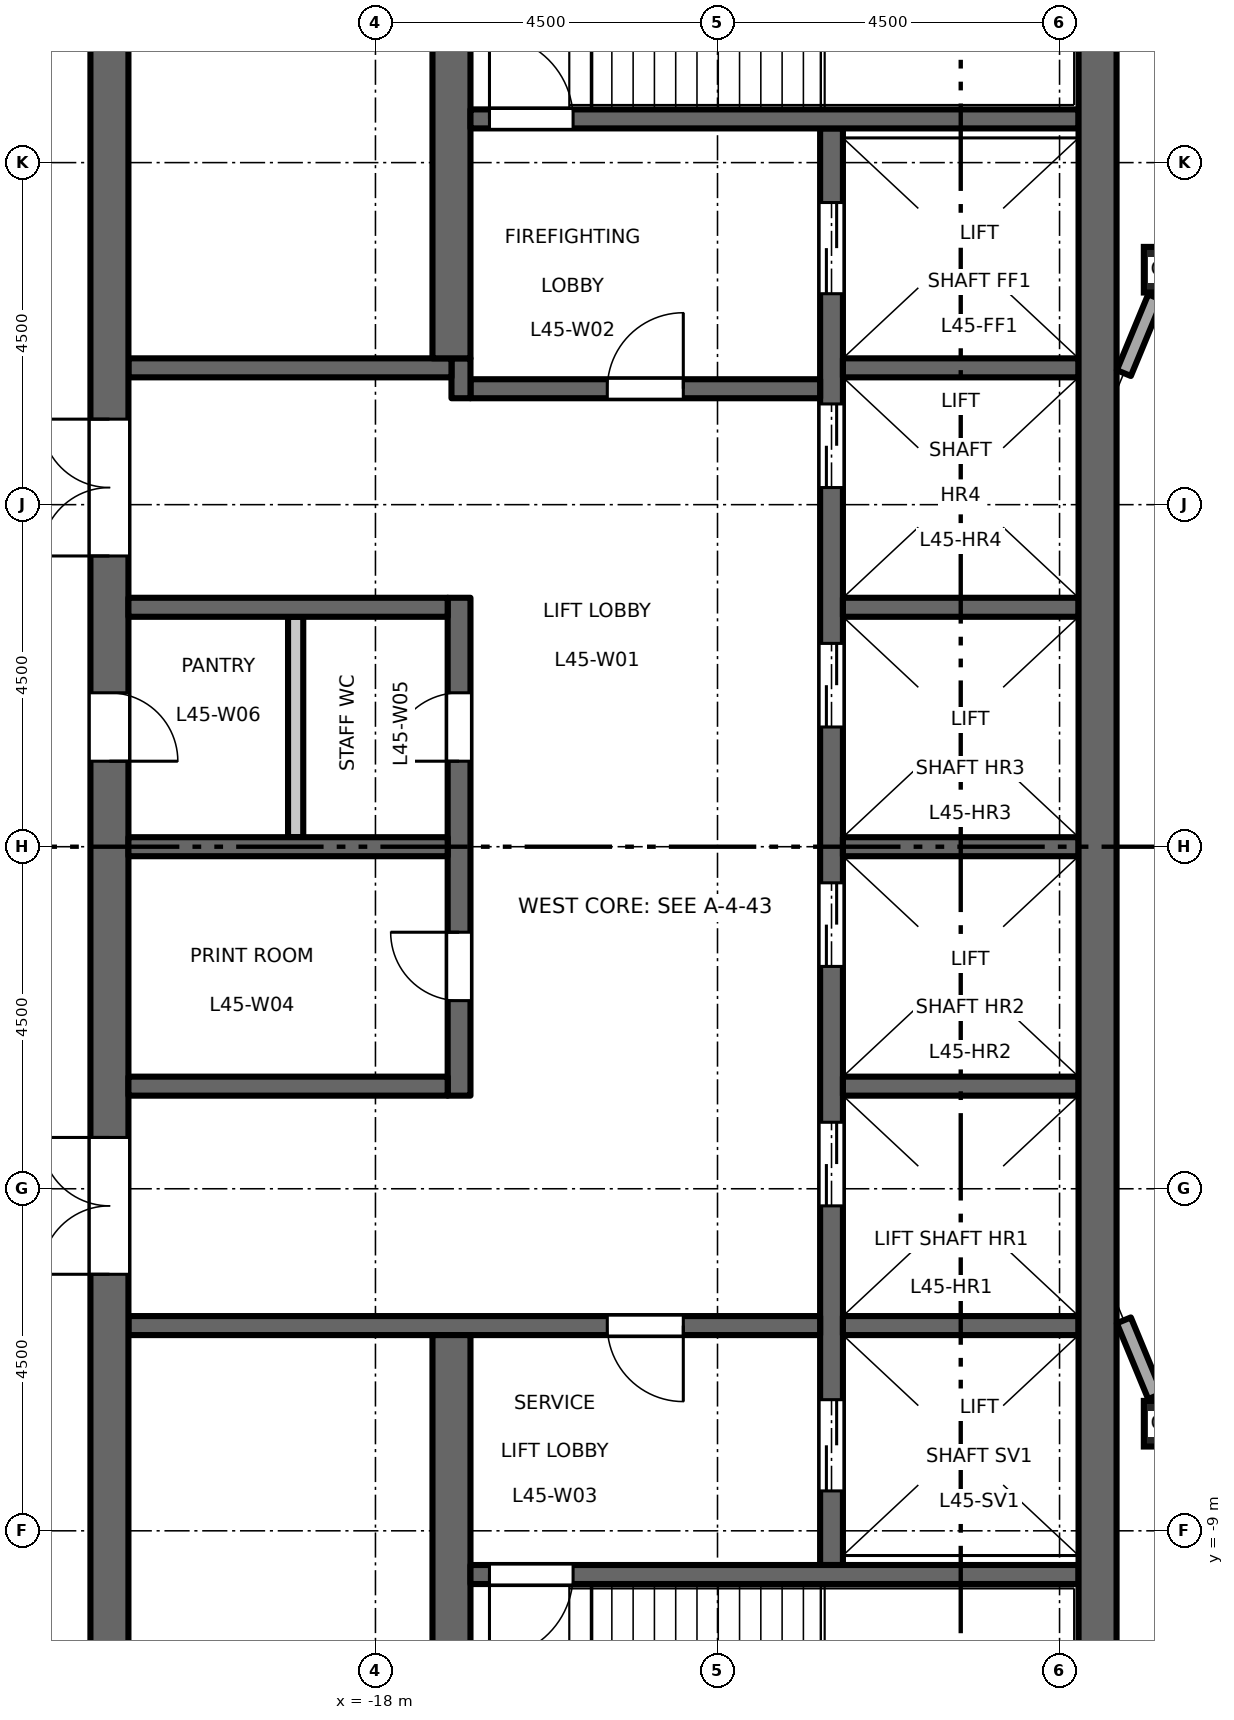
"""IFC4 building model, lengths in metres.
Left out: names, types, materials, properties, quantities, classifications, styles, units other than length and angle.
Written with IfcOpenShell. Run it as: python <this file> out.ifc"""

import sys

from ifc_helpers import new_model, si_unit, direction, frame, frame_2d, origin, origin_2d, place, context, subcontext, project, spatial, rectangle, hollow_rectangle, extrude, element, fill, save


model = new_model("IFC4")
c1 = context("Model", 3, precision=1e-05, world=origin(), true_north=direction((0.0, 1.0)))
c2 = subcontext(c1, "Body", "Model", "MODEL_VIEW")
j1 = project(units=[si_unit("LENGTHUNIT", "METRE"), si_unit("PLANEANGLEUNIT", "RADIAN")], contexts=[c1])
p1 = place(None, origin())
s1 = spatial("IfcSite", under=j1, at=p1, CompositionType="ELEMENT")
p2 = place(p1, origin())
s2 = spatial("IfcBuilding", under=s1, at=p2, CompositionType="ELEMENT")
p3 = place(p2, frame((0.0, 0.0, 210.7)))
s3 = spatial("IfcBuildingStorey", under=s2, at=p3, CompositionType="ELEMENT", Elevation=210.7)
for number, where, z_axis, x_axis in (
    (1, (-7.591, -7.591, 0.0), (0.0, 0.0, 1.0), (1.0, 0.0, 0.0)),
    (2, (-7.591, 7.591, 0.0), (0.0, 0.0, 1.0), (1.0, 0.0, 0.0)),
):
    element("IfcColumn", number, at=place(p3, frame(where, z_axis=z_axis, x_axis=x_axis)), inside=s3, PredefinedType="COLUMN", context=c2, shape_type="SweptSolid", body=[
        extrude(hollow_rectangle(XDim=0.6, YDim=0.6, WallThickness=0.032, at=origin_2d()), origin(), (0.0, 0.0, 1.0), 4.5),
    ])
p4 = place(p3, frame((-12.0, -9.45, 0.0), z_axis=(0.0, 0.0, 1.0), x_axis=(0.0, 1.0, 0.0)))
e3 = element("IfcWall", 3, at=p4, inside=s3, PredefinedType="SHEAR", context=c2, shape_type="SweptSolid", body=[
    extrude(rectangle(XDim=18.9, YDim=0.3, at=frame_2d((9.45, 0.0))), origin(), (0.0, 0.0, 1.0), 4.35),
])
p5 = place(p4, frame((4.725, 0.0, 0.0)))
e4 = element("IfcOpeningElement", 4, at=p5, cuts=e3, PredefinedType="OPENING", context=c2, shape_type="SweptSolid", body=[
    extrude(rectangle(XDim=1.1, YDim=2.1, at=frame_2d((0.55, 1.05))), frame((0.0, 0.16, 0.0), z_axis=(0.0, -1.0, 0.0), x_axis=(1.0, 0.0, 0.0)), (0.0, 0.0, 1.0), 0.32),
])
p6 = place(p4, frame((7.875, 0.0, 0.0)))
e5 = element("IfcOpeningElement", 5, at=p6, cuts=e3, PredefinedType="OPENING", context=c2, shape_type="SweptSolid", body=[
    extrude(rectangle(XDim=1.1, YDim=2.1, at=frame_2d((0.55, 1.05))), frame((0.0, 0.16, 0.0), z_axis=(0.0, -1.0, 0.0), x_axis=(1.0, 0.0, 0.0)), (0.0, 0.0, 1.0), 0.32),
])
p7 = place(p4, frame((11.025, 0.0, 0.0)))
e6 = element("IfcOpeningElement", 6, at=p7, cuts=e3, PredefinedType="OPENING", context=c2, shape_type="SweptSolid", body=[
    extrude(rectangle(XDim=1.1, YDim=2.1, at=frame_2d((0.55, 1.05))), frame((0.0, 0.16, 0.0), z_axis=(0.0, -1.0, 0.0), x_axis=(1.0, 0.0, 0.0)), (0.0, 0.0, 1.0), 0.32),
])
p8 = place(p4, frame((14.175, 0.0, 0.0)))
e7 = element("IfcOpeningElement", 7, at=p8, cuts=e3, PredefinedType="OPENING", context=c2, shape_type="SweptSolid", body=[
    extrude(rectangle(XDim=1.1, YDim=2.1, at=frame_2d((0.55, 1.05))), frame((0.0, 0.16, 0.0), z_axis=(0.0, -1.0, 0.0), x_axis=(1.0, 0.0, 0.0)), (0.0, 0.0, 1.0), 0.32),
])
p9 = place(p4, frame((16.725, 0.0, 0.0)))
e8 = element("IfcOpeningElement", 8, at=p9, cuts=e3, PredefinedType="OPENING", context=c2, shape_type="SweptSolid", body=[
    extrude(rectangle(XDim=1.2, YDim=2.1, at=frame_2d((0.6, 1.05))), frame((0.0, 0.16, 0.0), z_axis=(0.0, -1.0, 0.0), x_axis=(1.0, 0.0, 0.0)), (0.0, 0.0, 1.0), 0.32),
])
p10 = place(p4, frame((0.975, 0.0, 0.0)))
e9 = element("IfcOpeningElement", 9, at=p10, cuts=e3, PredefinedType="OPENING", context=c2, shape_type="SweptSolid", body=[
    extrude(rectangle(XDim=1.2, YDim=2.1, at=frame_2d((0.6, 1.05))), frame((0.0, 0.16, 0.0), z_axis=(0.0, -1.0, 0.0), x_axis=(1.0, 0.0, 0.0)), (0.0, 0.0, 1.0), 0.32),
])
p11 = place(p3, frame((-12.15, 6.025, 0.0), z_axis=(0.0, 0.0, 1.0), x_axis=(-1.0, 0.0, 0.0)))
e10 = element("IfcWall", 10, at=p11, inside=s3, PredefinedType="SHEAR", context=c2, shape_type="SweptSolid", body=[
    extrude(rectangle(XDim=4.6, YDim=0.25, at=frame_2d((2.3, 0.0))), origin(), (0.0, 0.0, 1.0), 4.35),
])
p12 = place(p11, frame((1.8, 0.0, 0.0)))
e11 = element("IfcOpeningElement", 11, at=p12, cuts=e10, PredefinedType="OPENING", context=c2, shape_type="SweptSolid", body=[
    extrude(rectangle(XDim=1.0, YDim=2.1, at=frame_2d((0.5, 1.05))), frame((0.0, 0.135, 0.0), z_axis=(0.0, -1.0, 0.0), x_axis=(1.0, 0.0, 0.0)), (0.0, 0.0, 1.0), 0.27),
])
p13 = place(p3, frame((-16.875, 5.9, 0.0), z_axis=(0.0, 0.0, 1.0), x_axis=(0.0, 1.0, 0.0)))
e12 = element("IfcWall", 12, at=p13, inside=s3, PredefinedType="SHEAR", context=c2, shape_type="SweptSolid", body=[
    extrude(rectangle(XDim=0.525, YDim=0.25, at=frame_2d((0.263, 0.0))), origin(), (0.0, 0.0, 1.0), 4.35),
])
p14 = place(p3, frame((-17.0, 6.3, 0.0), z_axis=(0.0, 0.0, 1.0), x_axis=(-1.0, 0.0, 0.0)))
e13 = element("IfcWall", 13, at=p14, inside=s3, PredefinedType="SHEAR", context=c2, shape_type="SweptSolid", body=[
    extrude(rectangle(XDim=4.25, YDim=0.25, at=frame_2d((2.125, 0.0))), origin(), (0.0, 0.0, 1.0), 4.35),
])
p15 = place(p3, frame((-12.15, -6.3, 0.0), z_axis=(0.0, 0.0, 1.0), x_axis=(-1.0, 0.0, 0.0)))
e14 = element("IfcWall", 14, at=p15, inside=s3, PredefinedType="SHEAR", context=c2, shape_type="SweptSolid", body=[
    extrude(rectangle(XDim=9.1, YDim=0.25, at=frame_2d((4.55, 0.0))), origin(), (0.0, 0.0, 1.0), 4.35),
])
p16 = place(p15, frame((1.8, 0.0, 0.0)))
e15 = element("IfcOpeningElement", 15, at=p16, cuts=e14, PredefinedType="OPENING", context=c2, shape_type="SweptSolid", body=[
    extrude(rectangle(XDim=1.0, YDim=2.1, at=frame_2d((0.5, 1.05))), frame((0.0, 0.135, 0.0), z_axis=(0.0, -1.0, 0.0), x_axis=(1.0, 0.0, 0.0)), (0.0, 0.0, 1.0), 0.27),
])
p17 = place(p3, frame((-21.5, -13.0, 0.0), z_axis=(0.0, 0.0, 1.0), x_axis=(0.0, 1.0, 0.0)))
e16 = element("IfcWall", 16, at=p17, inside=s3, PredefinedType="SHEAR", context=c2, shape_type="SweptSolid", body=[
    extrude(rectangle(XDim=26.0, YDim=0.5, at=frame_2d((13.0, 0.0))), origin(), (0.0, 0.0, 1.0), 4.35),
])
p18 = place(p17, frame((16.825, 0.0, 0.0)))
e17 = element("IfcOpeningElement", 17, at=p18, cuts=e16, PredefinedType="OPENING", context=c2, shape_type="SweptSolid", body=[
    extrude(rectangle(XDim=1.8, YDim=2.1, at=frame_2d((0.9, 1.05))), frame((0.0, 0.26, 0.0), z_axis=(0.0, -1.0, 0.0), x_axis=(1.0, 0.0, 0.0)), (0.0, 0.0, 1.0), 0.52),
])
p19 = place(p17, frame((7.375, 0.0, 0.0)))
e18 = element("IfcOpeningElement", 18, at=p19, cuts=e16, PredefinedType="OPENING", context=c2, shape_type="SweptSolid", body=[
    extrude(rectangle(XDim=1.8, YDim=2.1, at=frame_2d((0.9, 1.05))), frame((0.0, 0.26, 0.0), z_axis=(0.0, -1.0, 0.0), x_axis=(1.0, 0.0, 0.0)), (0.0, 0.0, 1.0), 0.52),
])
p20 = place(p17, frame((14.125, 0.0, 0.0)))
e19 = element("IfcOpeningElement", 19, at=p20, cuts=e16, PredefinedType="OPENING", context=c2, shape_type="SweptSolid", body=[
    extrude(rectangle(XDim=0.9, YDim=2.1, at=frame_2d((0.45, 1.05))), frame((0.0, 0.26, 0.0), z_axis=(0.0, -1.0, 0.0), x_axis=(1.0, 0.0, 0.0)), (0.0, 0.0, 1.0), 0.52),
])
p21 = place(p3, frame((-16.9, -3.275, 0.0), z_axis=(0.0, 0.0, 1.0), x_axis=(0.0, 1.0, 0.0)))
e20 = element("IfcWall", 20, at=p21, inside=s3, PredefinedType="SHEAR", context=c2, shape_type="SweptSolid", body=[
    extrude(rectangle(XDim=6.55, YDim=0.3, at=frame_2d((3.275, 0.0))), origin(), (0.0, 0.0, 1.0), 4.35),
])
p22 = place(p21, frame((1.25, 0.0, 0.0)))
e21 = element("IfcOpeningElement", 21, at=p22, cuts=e20, PredefinedType="OPENING", context=c2, shape_type="SweptSolid", body=[
    extrude(rectangle(XDim=0.9, YDim=2.1, at=frame_2d((0.45, 1.05))), frame((0.0, 0.16, 0.0), z_axis=(0.0, -1.0, 0.0), x_axis=(1.0, 0.0, 0.0)), (0.0, 0.0, 1.0), 0.32),
])
p23 = place(p21, frame((4.4, 0.0, 0.0)))
e22 = element("IfcOpeningElement", 22, at=p23, cuts=e20, PredefinedType="OPENING", context=c2, shape_type="SweptSolid", body=[
    extrude(rectangle(XDim=0.9, YDim=2.1, at=frame_2d((0.45, 1.05))), frame((0.0, 0.16, 0.0), z_axis=(0.0, -1.0, 0.0), x_axis=(1.0, 0.0, 0.0)), (0.0, 0.0, 1.0), 0.32),
])
for number, where, z_axis, x_axis in (
    (23, (-17.05, 0.0, 0.0), (0.0, 0.0, 1.0), (-1.0, 0.0, 0.0)),
    (24, (-17.05, 3.15, 0.0), (0.0, 0.0, 1.0), (-1.0, 0.0, 0.0)),
    (25, (-17.05, -3.15, 0.0), (0.0, 0.0, 1.0), (-1.0, 0.0, 0.0)),
):
    element("IfcWall", number, at=place(p3, frame(where, z_axis=z_axis, x_axis=x_axis)), inside=s3, PredefinedType="SHEAR", context=c2, shape_type="SweptSolid", body=[
        extrude(rectangle(XDim=4.2, YDim=0.25, at=frame_2d((2.1, 0.0))), origin(), (0.0, 0.0, 1.0), 4.35),
    ])
p24 = place(p3, frame((-19.05, 0.125, 0.0), z_axis=(0.0, 0.0, 1.0), x_axis=(0.0, 1.0, 0.0)))
e26 = element("IfcWall", 26, at=p24, inside=s3, PredefinedType="PARTITIONING", context=c2, shape_type="SweptSolid", body=[
    extrude(rectangle(XDim=2.9, YDim=0.2, at=frame_2d((1.45, 0.0))), origin(), (0.0, 0.0, 1.0), 4.35),
])
for number, where, z_axis, x_axis in (
    (27, (-17.0, 6.425, 0.0), (0.0, 0.0, 1.0), (0.0, 1.0, 0.0)),
    (28, (-17.0, -13.0, 0.0), (0.0, 0.0, 1.0), (0.0, 1.0, 0.0)),
):
    element("IfcWall", number, at=place(p3, frame(where, z_axis=z_axis, x_axis=x_axis)), inside=s3, PredefinedType="SHEAR", context=c2, shape_type="SweptSolid", body=[
        extrude(rectangle(XDim=6.575, YDim=0.5, at=frame_2d((3.288, 0.0))), origin(), (0.0, 0.0, 1.0), 4.35),
    ])
for number, where, z_axis, x_axis in (
    (29, (-8.75, 0.0, 0.0), (0.0, 0.0, 1.0), (-1.0, 0.0, 0.0)),
    (30, (-8.75, 3.15, 0.0), (0.0, 0.0, 1.0), (-1.0, 0.0, 0.0)),
    (31, (-8.75, 6.3, 0.0), (0.0, 0.0, 1.0), (-1.0, 0.0, 0.0)),
    (32, (-8.75, -3.15, 0.0), (0.0, 0.0, 1.0), (-1.0, 0.0, 0.0)),
    (33, (-8.75, -6.3, 0.0), (0.0, 0.0, 1.0), (-1.0, 0.0, 0.0)),
):
    element("IfcWall", number, at=place(p3, frame(where, z_axis=z_axis, x_axis=x_axis)), inside=s3, PredefinedType="SHEAR", context=c2, shape_type="SweptSolid", body=[
        extrude(rectangle(XDim=3.1, YDim=0.25, at=frame_2d((1.55, 0.0))), origin(), (0.0, 0.0, 1.0), 4.35),
    ])
p25 = place(p3, frame((-8.75, 9.575, 0.0), z_axis=(0.0, 0.0, 1.0), x_axis=(-1.0, 0.0, 0.0)))
e34 = element("IfcWall", 34, at=p25, inside=s3, PredefinedType="SHEAR", context=c2, shape_type="SweptSolid", body=[
    extrude(rectangle(XDim=8.0, YDim=0.25, at=frame_2d((4.0, 0.0))), origin(), (0.0, 0.0, 1.0), 4.35),
])
p26 = place(p25, frame((6.65, 0.0, 0.0)))
e35 = element("IfcOpeningElement", 35, at=p26, cuts=e34, PredefinedType="OPENING", context=c2, shape_type="SweptSolid", body=[
    extrude(rectangle(XDim=1.1, YDim=2.1, at=frame_2d((0.55, 1.05))), frame((0.0, 0.135, 0.0), z_axis=(0.0, -1.0, 0.0), x_axis=(1.0, 0.0, 0.0)), (0.0, 0.0, 1.0), 0.27),
])
p27 = place(p3, frame((-8.75, -9.575, 0.0), z_axis=(0.0, 0.0, 1.0), x_axis=(-1.0, 0.0, 0.0)))
e36 = element("IfcWall", 36, at=p27, inside=s3, PredefinedType="SHEAR", context=c2, shape_type="SweptSolid", body=[
    extrude(rectangle(XDim=8.0, YDim=0.25, at=frame_2d((4.0, 0.0))), origin(), (0.0, 0.0, 1.0), 4.35),
])
p28 = place(p27, frame((6.65, 0.0, 0.0)))
e37 = element("IfcOpeningElement", 37, at=p28, cuts=e36, PredefinedType="OPENING", context=c2, shape_type="SweptSolid", body=[
    extrude(rectangle(XDim=1.1, YDim=2.1, at=frame_2d((0.55, 1.05))), frame((0.0, 0.135, 0.0), z_axis=(0.0, -1.0, 0.0), x_axis=(1.0, 0.0, 0.0)), (0.0, 0.0, 1.0), 0.27),
])
p29 = place(p3, frame((-8.5, -13.0, 0.0), z_axis=(0.0, 0.0, 1.0), x_axis=(0.0, 1.0, 0.0)))
e38 = element("IfcWall", 38, at=p29, inside=s3, PredefinedType="SHEAR", context=c2, shape_type="SweptSolid", body=[
    extrude(rectangle(XDim=26.0, YDim=0.5, at=frame_2d((13.0, 0.0))), origin(), (0.0, 0.0, 1.0), 4.35),
])
for number, where, z_axis, x_axis in (
    (39, (-7.741, 7.229, 0.0), (0.0, 0.0, 1.0), (-0.383, -0.924, 0.0)),
    (40, (-8.154, -6.231, 0.0), (0.0, 0.0, 1.0), (0.383, -0.924, 0.0)),
):
    element("IfcWall", number, at=place(p3, frame(where, z_axis=z_axis, x_axis=x_axis)), inside=s3, PredefinedType="STANDARD", context=c2, shape_type="SweptSolid", body=[
        extrude(rectangle(XDim=1.08, YDim=0.2, at=frame_2d((0.54, 0.0))), origin(), (0.0, 0.0, 1.0), 3.918),
    ])
p30 = place(p12, origin())
e41 = element("IfcDoor", 41, at=p30, inside=s3, OperationType="SINGLE_SWING_LEFT", PredefinedType="DOOR", context=c2, shape_type="SweptSolid", body=[
    extrude(rectangle(XDim=1.0, YDim=2.1, at=frame_2d((0.5, 1.05))), frame((0.0, 0.025, 0.0), z_axis=(0.0, -1.0, 0.0), x_axis=(1.0, 0.0, 0.0)), (0.0, 0.0, 1.0), 0.05),
])
fill(e11, e41)
p31 = place(p16, origin())
e42 = element("IfcDoor", 42, at=p31, inside=s3, OperationType="SINGLE_SWING_RIGHT", PredefinedType="DOOR", context=c2, shape_type="SweptSolid", body=[
    extrude(rectangle(XDim=1.0, YDim=2.1, at=frame_2d((0.5, 1.05))), frame((0.0, 0.025, 0.0), z_axis=(0.0, -1.0, 0.0), x_axis=(1.0, 0.0, 0.0)), (0.0, 0.0, 1.0), 0.05),
])
fill(e15, e42)
p32 = place(p26, origin())
e43 = element("IfcDoor", 43, at=p32, inside=s3, OperationType="SINGLE_SWING_RIGHT", PredefinedType="DOOR", context=c2, shape_type="SweptSolid", body=[
    extrude(rectangle(XDim=1.1, YDim=2.1, at=frame_2d((0.55, 1.05))), frame((0.0, 0.025, 0.0), z_axis=(0.0, -1.0, 0.0), x_axis=(1.0, 0.0, 0.0)), (0.0, 0.0, 1.0), 0.05),
])
fill(e35, e43)
p33 = place(p28, origin())
e44 = element("IfcDoor", 44, at=p33, inside=s3, OperationType="SINGLE_SWING_LEFT", PredefinedType="DOOR", context=c2, shape_type="SweptSolid", body=[
    extrude(rectangle(XDim=1.1, YDim=2.1, at=frame_2d((0.55, 1.05))), frame((0.0, 0.025, 0.0), z_axis=(0.0, -1.0, 0.0), x_axis=(1.0, 0.0, 0.0)), (0.0, 0.0, 1.0), 0.05),
])
fill(e37, e44)
p34 = place(p18, origin())
e45 = element("IfcDoor", 45, at=p34, inside=s3, OperationType="DOUBLE_DOOR_DOUBLE_SWING", PredefinedType="DOOR", context=c2, shape_type="SweptSolid", body=[
    extrude(rectangle(XDim=1.8, YDim=2.1, at=frame_2d((0.9, 1.05))), frame((0.0, 0.025, 0.0), z_axis=(0.0, -1.0, 0.0), x_axis=(1.0, 0.0, 0.0)), (0.0, 0.0, 1.0), 0.05),
])
fill(e17, e45)
p35 = place(p19, origin())
e46 = element("IfcDoor", 46, at=p35, inside=s3, OperationType="DOUBLE_DOOR_DOUBLE_SWING", PredefinedType="DOOR", context=c2, shape_type="SweptSolid", body=[
    extrude(rectangle(XDim=1.8, YDim=2.1, at=frame_2d((0.9, 1.05))), frame((0.0, 0.025, 0.0), z_axis=(0.0, -1.0, 0.0), x_axis=(1.0, 0.0, 0.0)), (0.0, 0.0, 1.0), 0.05),
])
fill(e18, e46)
p36 = place(p5, origin())
e47 = element("IfcDoor", 47, at=p36, inside=s3, OperationType="DOUBLE_DOOR_SLIDING", PredefinedType="DOOR", context=c2, shape_type="SweptSolid", body=[
    extrude(rectangle(XDim=1.1, YDim=2.1, at=frame_2d((0.55, 1.05))), frame((0.0, 0.025, 0.0), z_axis=(0.0, -1.0, 0.0), x_axis=(1.0, 0.0, 0.0)), (0.0, 0.0, 1.0), 0.05),
])
fill(e4, e47)
p37 = place(p6, origin())
e48 = element("IfcDoor", 48, at=p37, inside=s3, OperationType="DOUBLE_DOOR_SLIDING", PredefinedType="DOOR", context=c2, shape_type="SweptSolid", body=[
    extrude(rectangle(XDim=1.1, YDim=2.1, at=frame_2d((0.55, 1.05))), frame((0.0, 0.025, 0.0), z_axis=(0.0, -1.0, 0.0), x_axis=(1.0, 0.0, 0.0)), (0.0, 0.0, 1.0), 0.05),
])
fill(e5, e48)
p38 = place(p7, origin())
e49 = element("IfcDoor", 49, at=p38, inside=s3, OperationType="DOUBLE_DOOR_SLIDING", PredefinedType="DOOR", context=c2, shape_type="SweptSolid", body=[
    extrude(rectangle(XDim=1.1, YDim=2.1, at=frame_2d((0.55, 1.05))), frame((0.0, 0.025, 0.0), z_axis=(0.0, -1.0, 0.0), x_axis=(1.0, 0.0, 0.0)), (0.0, 0.0, 1.0), 0.05),
])
fill(e6, e49)
p39 = place(p8, origin())
e50 = element("IfcDoor", 50, at=p39, inside=s3, OperationType="DOUBLE_DOOR_SLIDING", PredefinedType="DOOR", context=c2, shape_type="SweptSolid", body=[
    extrude(rectangle(XDim=1.1, YDim=2.1, at=frame_2d((0.55, 1.05))), frame((0.0, 0.025, 0.0), z_axis=(0.0, -1.0, 0.0), x_axis=(1.0, 0.0, 0.0)), (0.0, 0.0, 1.0), 0.05),
])
fill(e7, e50)
p40 = place(p9, origin())
e51 = element("IfcDoor", 51, at=p40, inside=s3, OperationType="DOUBLE_DOOR_SLIDING", PredefinedType="DOOR", context=c2, shape_type="SweptSolid", body=[
    extrude(rectangle(XDim=1.2, YDim=2.1, at=frame_2d((0.6, 1.05))), frame((0.0, 0.025, 0.0), z_axis=(0.0, -1.0, 0.0), x_axis=(1.0, 0.0, 0.0)), (0.0, 0.0, 1.0), 0.05),
])
fill(e8, e51)
p41 = place(p10, origin())
e52 = element("IfcDoor", 52, at=p41, inside=s3, OperationType="DOUBLE_DOOR_SLIDING", PredefinedType="DOOR", context=c2, shape_type="SweptSolid", body=[
    extrude(rectangle(XDim=1.2, YDim=2.1, at=frame_2d((0.6, 1.05))), frame((0.0, 0.025, 0.0), z_axis=(0.0, -1.0, 0.0), x_axis=(1.0, 0.0, 0.0)), (0.0, 0.0, 1.0), 0.05),
])
fill(e9, e52)
p42 = place(p22, origin())
e53 = element("IfcDoor", 53, at=p42, inside=s3, OperationType="SINGLE_SWING_LEFT", PredefinedType="DOOR", context=c2, shape_type="SweptSolid", body=[
    extrude(rectangle(XDim=0.9, YDim=2.1, at=frame_2d((0.45, 1.05))), frame((0.0, 0.025, 0.0), z_axis=(0.0, -1.0, 0.0), x_axis=(1.0, 0.0, 0.0)), (0.0, 0.0, 1.0), 0.05),
])
fill(e21, e53)
p43 = place(p23, origin())
e54 = element("IfcDoor", 54, at=p43, inside=s3, OperationType="SINGLE_SWING_RIGHT", PredefinedType="DOOR", context=c2, shape_type="SweptSolid", body=[
    extrude(rectangle(XDim=0.9, YDim=2.1, at=frame_2d((0.45, 1.05))), frame((0.0, 0.025, 0.0), z_axis=(0.0, -1.0, 0.0), x_axis=(1.0, 0.0, 0.0)), (0.0, 0.0, 1.0), 0.05),
])
fill(e22, e54)
p44 = place(p20, origin())
e55 = element("IfcDoor", 55, at=p44, inside=s3, OperationType="SINGLE_SWING_LEFT", PredefinedType="DOOR", context=c2, shape_type="SweptSolid", body=[
    extrude(rectangle(XDim=0.9, YDim=2.1, at=frame_2d((0.45, 1.05))), frame((0.0, 0.025, 0.0), z_axis=(0.0, -1.0, 0.0), x_axis=(1.0, 0.0, 0.0)), (0.0, 0.0, 1.0), 0.05),
])
fill(e19, e55)
save(model, sys.argv[1])
